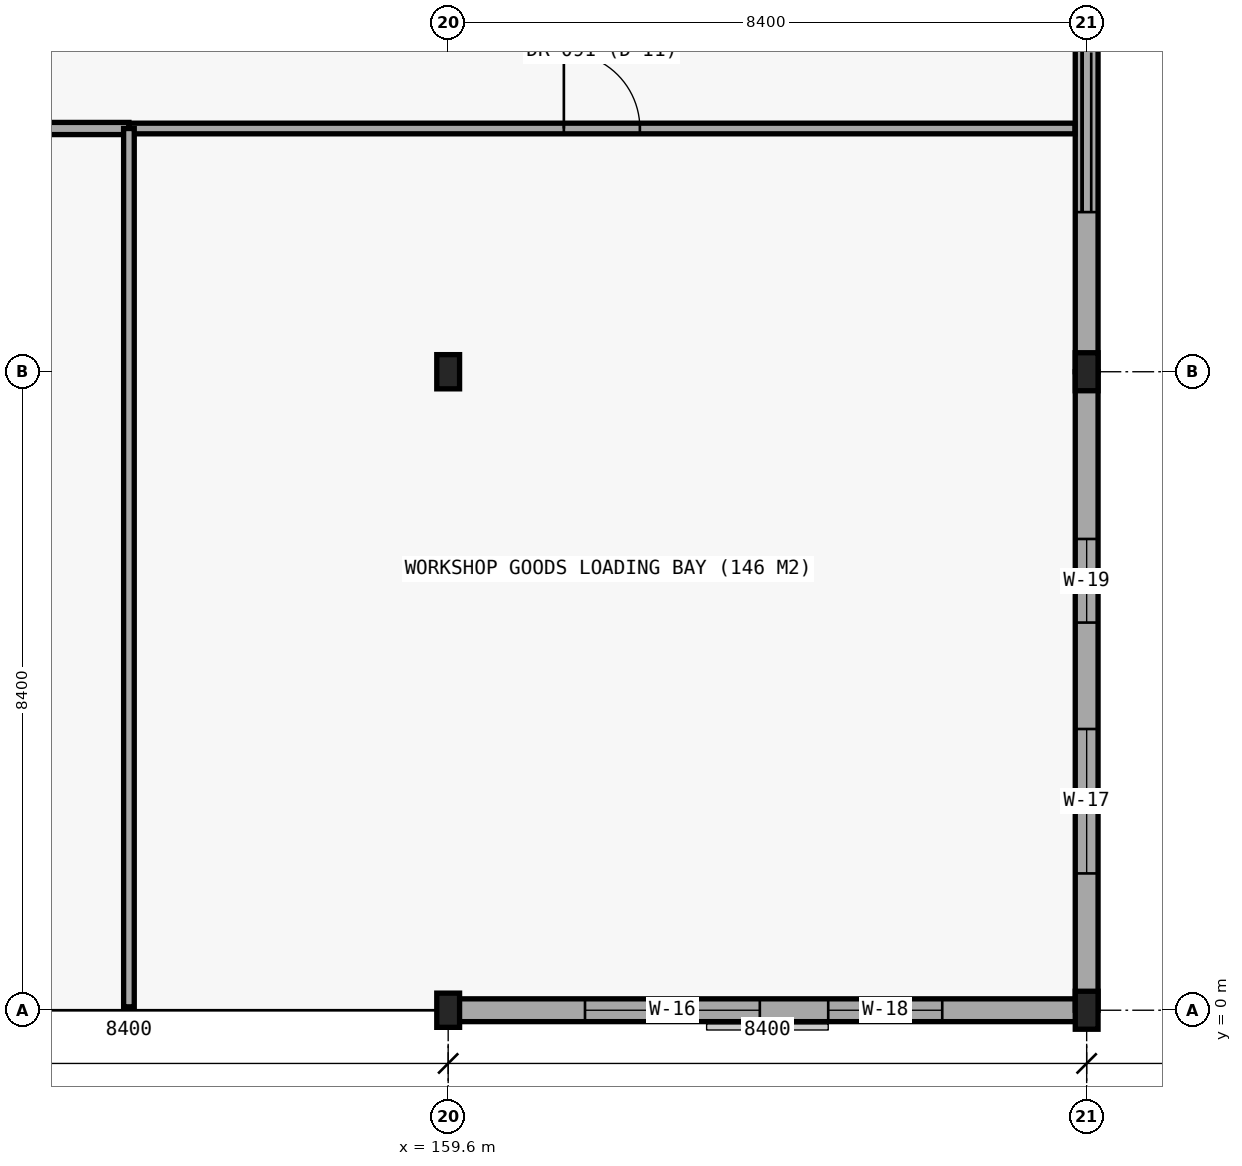
"""IFC4 building model, lengths in metres.
Left out: names, types, materials, properties, quantities, classifications, styles, units other than length and angle.
Written with IfcOpenShell. Run it as: python <this file> out.ifc"""

import sys

from ifc_helpers import new_model, si_unit, direction, frame, frame_2d, origin, origin_2d, place, context, subcontext, project, spatial, rectangle, i_section, extrude, element, fill, save


model = new_model("IFC4")
c1 = context("Model", 3, precision=1e-05, world=origin(), true_north=direction((0.0, 1.0)))
c2 = subcontext(c1, "Body", "Model", "MODEL_VIEW")
j1 = project(units=[si_unit("LENGTHUNIT", "METRE"), si_unit("PLANEANGLEUNIT", "RADIAN")], contexts=[c1])
p1 = place(None, origin())
s1 = spatial("IfcSite", under=j1, at=p1, CompositionType="ELEMENT")
p2 = place(p1, origin())
s2 = spatial("IfcBuilding", under=s1, at=p2, CompositionType="ELEMENT")
p3 = place(p2, origin())
s3 = spatial("IfcBuildingStorey", under=s2, at=p3, CompositionType="ELEMENT", Elevation=0.0)
for number, where, z_axis, x_axis in (
    (1, (159.6, 0.0, 0.0), (0.0, 0.0, 1.0), (1.0, 0.0, 0.0)),
    (2, (159.6, 8.4, 0.0), (0.0, 0.0, 1.0), (1.0, 0.0, 0.0)),
):
    element("IfcColumn", number, at=place(p3, frame(where, z_axis=z_axis, x_axis=x_axis)), inside=s3, PredefinedType="COLUMN", context=c2, shape_type="SweptSolid", body=[
        extrude(i_section(OverallWidth=0.3, OverallDepth=0.45, WebThickness=0.014, FlangeThickness=0.026, FilletRadius=0.027, at=origin_2d()), origin(), (0.0, 0.0, 1.0), 4.8),
    ])
for number, where, z_axis, x_axis in (
    (3, (168.0, 0.0, 0.0), (0.0, 0.0, 1.0), (1.0, 0.0, 0.0)),
    (4, (168.0, 8.4, 0.0), (0.0, 0.0, 1.0), (1.0, 0.0, 0.0)),
):
    element("IfcColumn", number, at=place(p3, frame(where, z_axis=z_axis, x_axis=x_axis)), inside=s3, PredefinedType="COLUMN", context=c2, shape_type="SweptSolid", body=[
        extrude(i_section(OverallWidth=0.3, OverallDepth=0.5, WebThickness=0.014, FlangeThickness=0.028, FilletRadius=0.027, at=origin_2d()), origin(), (0.0, 0.0, 1.0), 4.8),
    ])
p4 = place(p3, frame((159.6, 0.0, 0.0), z_axis=(0.0, 0.0, 1.0), x_axis=(1.0, 0.0, 0.0)))
e5 = element("IfcWall", 5, at=p4, inside=s3, PredefinedType="STANDARD", context=c2, shape_type="SweptSolid", body=[
    extrude(rectangle(XDim=8.4, YDim=0.3, at=frame_2d((4.2, 0.0))), origin(), (0.0, 0.0, 1.0), 4.18),
])
p5 = place(p4, frame((1.8, 0.0, 1.05)))
e6 = element("IfcOpeningElement", 6, at=p5, cuts=e5, PredefinedType="OPENING", context=c2, shape_type="SweptSolid", body=[
    extrude(rectangle(XDim=2.3, YDim=1.9, at=frame_2d((1.15, 0.95))), frame((0.0, 0.16, 0.0), z_axis=(0.0, -1.0, 0.0), x_axis=(1.0, 0.0, 0.0)), (0.0, 0.0, 1.0), 0.32),
])
p6 = place(p4, frame((5.0, 0.0, 1.15)))
e7 = element("IfcOpeningElement", 7, at=p6, cuts=e5, PredefinedType="OPENING", context=c2, shape_type="SweptSolid", body=[
    extrude(rectangle(XDim=1.5, YDim=1.7, at=frame_2d((0.75, 0.85))), frame((0.0, 0.16, 0.0), z_axis=(0.0, -1.0, 0.0), x_axis=(1.0, 0.0, 0.0)), (0.0, 0.0, 1.0), 0.32),
])
p7 = place(p3, frame((168.0, 0.0, 0.0), z_axis=(0.0, 0.0, 1.0), x_axis=(0.0, 1.0, 0.0)))
e8 = element("IfcWall", 8, at=p7, inside=s3, PredefinedType="STANDARD", context=c2, shape_type="SweptSolid", body=[
    extrude(rectangle(XDim=8.4, YDim=0.3, at=frame_2d((4.2, 0.0))), origin(), (0.0, 0.0, 1.0), 4.18),
])
p8 = place(p7, frame((1.8, 0.0, 1.05)))
e9 = element("IfcOpeningElement", 9, at=p8, cuts=e8, PredefinedType="OPENING", context=c2, shape_type="SweptSolid", body=[
    extrude(rectangle(XDim=1.9, YDim=1.9, at=frame_2d((0.95, 0.95))), frame((0.0, 0.16, 0.0), z_axis=(0.0, -1.0, 0.0), x_axis=(1.0, 0.0, 0.0)), (0.0, 0.0, 1.0), 0.32),
])
p9 = place(p7, frame((5.1, 0.0, 1.2)))
e10 = element("IfcOpeningElement", 10, at=p9, cuts=e8, PredefinedType="OPENING", context=c2, shape_type="SweptSolid", body=[
    extrude(rectangle(XDim=1.1, YDim=1.6, at=frame_2d((0.55, 0.8))), frame((0.0, 0.16, 0.0), z_axis=(0.0, -1.0, 0.0), x_axis=(1.0, 0.0, 0.0)), (0.0, 0.0, 1.0), 0.32),
])
p10 = place(p3, frame((168.0, 8.4, 0.0), z_axis=(0.0, 0.0, 1.0), x_axis=(0.0, 1.0, 0.0)))
e11 = element("IfcWall", 11, at=p10, inside=s3, PredefinedType="STANDARD", context=c2, shape_type="SweptSolid", body=[
    extrude(rectangle(XDim=8.4, YDim=0.3, at=frame_2d((4.2, 0.0))), origin(), (0.0, 0.0, 1.0), 4.1),
])
p11 = place(p10, frame((2.1, 0.0, 0.0)))
e12 = element("IfcOpeningElement", 12, at=p11, cuts=e11, PredefinedType="OPENING", context=c2, shape_type="SweptSolid", body=[
    extrude(rectangle(XDim=4.2, YDim=3.8, at=frame_2d((2.1, 1.9))), frame((0.0, 0.16, 0.0), z_axis=(0.0, -1.0, 0.0), x_axis=(1.0, 0.0, 0.0)), (0.0, 0.0, 1.0), 0.32),
])
p12 = place(p3, frame((134.55, 11.6, 0.0), z_axis=(0.0, 0.0, 1.0), x_axis=(1.0, 0.0, 0.0)))
e13 = element("IfcWall", 13, at=p12, inside=s3, PredefinedType="PARTITIONING", context=c2, shape_type="SweptSolid", body=[
    extrude(rectangle(XDim=20.85, YDim=0.16, at=frame_2d((10.425, 0.0))), origin(), (0.0, 0.0, 1.0), 4.1),
])
p13 = place(p12, frame((9.97, 0.0, 0.0)))
e14 = element("IfcOpeningElement", 14, at=p13, cuts=e13, PredefinedType="OPENING", context=c2, shape_type="SweptSolid", body=[
    extrude(rectangle(XDim=1.4, YDim=2.25, at=frame_2d((0.7, 1.125))), frame((0.0, 0.09, 0.0), z_axis=(0.0, -1.0, 0.0), x_axis=(1.0, 0.0, 0.0)), (0.0, 0.0, 1.0), 0.18),
])
p14 = place(p3, frame((155.4, 11.6, 0.0), z_axis=(0.0, 0.0, 1.0), x_axis=(1.0, 0.0, 0.0)))
e15 = element("IfcWall", 15, at=p14, inside=s3, PredefinedType="PARTITIONING", context=c2, shape_type="SweptSolid", body=[
    extrude(rectangle(XDim=12.445, YDim=0.14, at=frame_2d((6.223, 0.0))), origin(), (0.0, 0.0, 1.0), 4.1),
])
p15 = place(p14, frame((5.722, 0.0, 0.0)))
e16 = element("IfcOpeningElement", 16, at=p15, cuts=e15, PredefinedType="OPENING", context=c2, shape_type="SweptSolid", body=[
    extrude(rectangle(XDim=1.0, YDim=2.15, at=frame_2d((0.5, 1.075))), frame((0.0, 0.08, 0.0), z_axis=(0.0, -1.0, 0.0), x_axis=(1.0, 0.0, 0.0)), (0.0, 0.0, 1.0), 0.16),
])
p16 = place(p3, frame((155.4, 0.045, 0.0), z_axis=(0.0, 0.0, 1.0), x_axis=(0.0, 1.0, 0.0)))
e17 = element("IfcWall", 17, at=p16, inside=s3, PredefinedType="PARTITIONING", context=c2, shape_type="SweptSolid", body=[
    extrude(rectangle(XDim=11.555, YDim=0.14, at=frame_2d((5.778, 0.0))), origin(), (0.0, 0.0, 1.0), 4.1),
])
p17 = place(p5, origin())
e18 = element("IfcWindow", 18, at=p17, inside=s3, PartitioningType="SINGLE_PANEL", PredefinedType="WINDOW", context=c2, shape_type="SweptSolid", body=[
    extrude(rectangle(XDim=2.3, YDim=1.9, at=frame_2d((1.15, 0.95))), frame((0.0, 0.03, 0.0), z_axis=(0.0, -1.0, 0.0), x_axis=(1.0, 0.0, 0.0)), (0.0, 0.0, 1.0), 0.06),
])
fill(e6, e18)
p18 = place(p6, origin())
e19 = element("IfcWindow", 19, at=p18, inside=s3, PartitioningType="SINGLE_PANEL", PredefinedType="WINDOW", context=c2, shape_type="SweptSolid", body=[
    extrude(rectangle(XDim=1.5, YDim=1.7, at=frame_2d((0.75, 0.85))), frame((0.0, 0.03, 0.0), z_axis=(0.0, -1.0, 0.0), x_axis=(1.0, 0.0, 0.0)), (0.0, 0.0, 1.0), 0.06),
])
fill(e7, e19)
p19 = place(p8, origin())
e20 = element("IfcWindow", 20, at=p19, inside=s3, PartitioningType="SINGLE_PANEL", PredefinedType="WINDOW", context=c2, shape_type="SweptSolid", body=[
    extrude(rectangle(XDim=1.9, YDim=1.9, at=frame_2d((0.95, 0.95))), frame((0.0, 0.03, 0.0), z_axis=(0.0, -1.0, 0.0), x_axis=(1.0, 0.0, 0.0)), (0.0, 0.0, 1.0), 0.06),
])
fill(e9, e20)
p20 = place(p9, origin())
e21 = element("IfcWindow", 21, at=p20, inside=s3, PartitioningType="SINGLE_PANEL", PredefinedType="WINDOW", context=c2, shape_type="SweptSolid", body=[
    extrude(rectangle(XDim=1.1, YDim=1.6, at=frame_2d((0.55, 0.8))), frame((0.0, 0.03, 0.0), z_axis=(0.0, -1.0, 0.0), x_axis=(1.0, 0.0, 0.0)), (0.0, 0.0, 1.0), 0.06),
])
fill(e10, e21)
p21 = place(p11, origin())
e22 = element("IfcDoor", 22, at=p21, inside=s3, OperationType="ROLLINGUP", PredefinedType="GATE", context=c2, shape_type="SweptSolid", body=[
    extrude(rectangle(XDim=4.2, YDim=3.8, at=frame_2d((2.1, 1.9))), frame((0.0, 0.025, 0.0), z_axis=(0.0, -1.0, 0.0), x_axis=(1.0, 0.0, 0.0)), (0.0, 0.0, 1.0), 0.05),
])
fill(e12, e22)
p22 = place(p15, origin())
e23 = element("IfcDoor", 23, at=p22, inside=s3, OperationType="SINGLE_SWING_LEFT", PredefinedType="DOOR", context=c2, shape_type="SweptSolid", body=[
    extrude(rectangle(XDim=1.0, YDim=2.15, at=frame_2d((0.5, 1.075))), frame((0.0, 0.025, 0.0), z_axis=(0.0, -1.0, 0.0), x_axis=(1.0, 0.0, 0.0)), (0.0, 0.0, 1.0), 0.05),
])
fill(e16, e23)
save(model, sys.argv[1])
